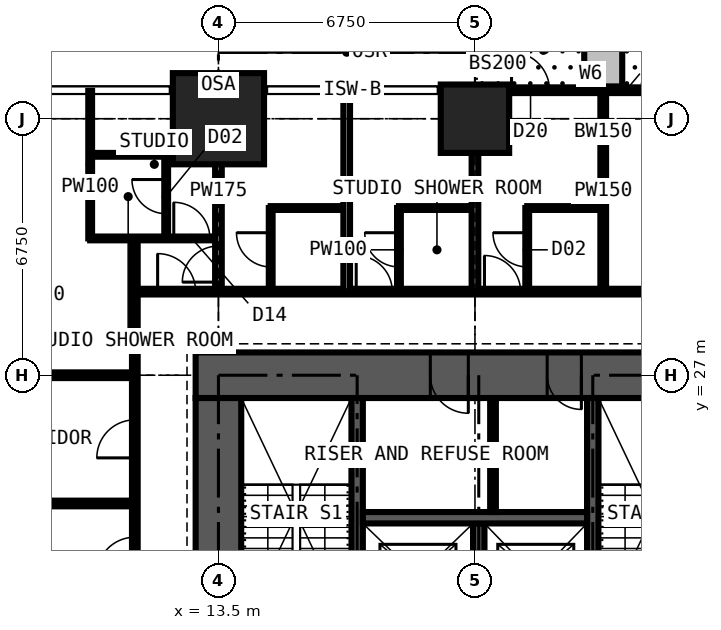
"""IFC4 building model, lengths in metres.
Left out: names, types, materials, properties, quantities, classifications, styles, units other than length and angle.
Written with IfcOpenShell. Run it as: python <this file> out.ifc"""

import sys

from ifc_helpers import new_model, si_unit, direction, frame, frame_2d, origin, origin_2d, place, context, subcontext, project, spatial, rectangle, extrude, element, fill, save


model = new_model("IFC4")
c1 = context("Model", 3, precision=1e-05, world=origin(), true_north=direction((0.0, 1.0)))
c2 = subcontext(c1, "Body", "Model", "MODEL_VIEW")
j1 = project(units=[si_unit("LENGTHUNIT", "METRE"), si_unit("PLANEANGLEUNIT", "RADIAN")], contexts=[c1])
p1 = place(None, origin())
s1 = spatial("IfcSite", under=j1, at=p1, CompositionType="ELEMENT")
p2 = place(p1, origin())
s2 = spatial("IfcBuilding", under=s1, at=p2, CompositionType="ELEMENT")
p3 = place(p2, frame((0.0, 0.0, 83.7)))
s3 = spatial("IfcBuildingStorey", under=s2, at=p3, CompositionType="ELEMENT", Elevation=83.7)
p4 = place(p3, frame((13.5, 33.75, 0.0), z_axis=(0.0, 0.0, 1.0), x_axis=(1.0, 0.0, 0.0)))
e1 = element("IfcColumn", 1, at=p4, inside=s3, PredefinedType="COLUMN", context=c2, shape_type="SweptSolid", body=[
    extrude(rectangle(XDim=2.4, YDim=2.4, at=origin_2d()), origin(), (0.0, 0.0, 1.0), 3.6),
])
p5 = place(p3, frame((20.25, 33.75, 0.0), z_axis=(0.0, 0.0, 1.0), x_axis=(1.0, 0.0, 0.0)))
e2 = element("IfcColumn", 2, at=p5, inside=s3, PredefinedType="COLUMN", context=c2, shape_type="SweptSolid", body=[
    extrude(rectangle(XDim=1.8, YDim=1.8, at=origin_2d()), origin(), (0.0, 0.0, 1.0), 3.6),
])
p6 = place(p3, frame((27.6, 27.0, 0.0), z_axis=(0.0, 0.0, 1.0), x_axis=(-1.0, 0.0, 0.0)))
e3 = element("IfcWall", 3, at=p6, inside=s3, PredefinedType="SHEAR", context=c2, shape_type="SweptSolid", body=[
    extrude(rectangle(XDim=14.7, YDim=1.2, at=frame_2d((7.35, 0.0))), origin(), (0.0, 0.0, 1.0), 3.6),
])
p7 = place(p6, frame((4.55, 0.0, 0.0)))
e4 = element("IfcOpeningElement", 4, at=p7, cuts=e3, PredefinedType="OPENING", context=c2, shape_type="SweptSolid", body=[
    extrude(rectangle(XDim=0.9, YDim=2.2, at=frame_2d((0.45, 1.1))), frame((0.0, 0.61, 0.0), z_axis=(0.0, -1.0, 0.0), x_axis=(1.0, 0.0, 0.0)), (0.0, 0.0, 1.0), 1.22),
])
p8 = place(p6, frame((7.525, 0.0, 0.0)))
e5 = element("IfcOpeningElement", 5, at=p8, cuts=e3, PredefinedType="OPENING", context=c2, shape_type="SweptSolid", body=[
    extrude(rectangle(XDim=1.0, YDim=2.2, at=frame_2d((0.5, 1.1))), frame((0.0, 0.61, 0.0), z_axis=(0.0, -1.0, 0.0), x_axis=(1.0, 0.0, 0.0)), (0.0, 0.0, 1.0), 1.22),
])
p9 = place(p3, frame((13.5, 26.4, 0.0), z_axis=(0.0, 0.0, 1.0), x_axis=(0.0, -1.0, 0.0)))
e6 = element("IfcWall", 6, at=p9, inside=s3, PredefinedType="SHEAR", context=c2, shape_type="SweptSolid", body=[
    extrude(rectangle(XDim=12.3, YDim=1.2, at=frame_2d((6.15, 0.0))), origin(), (0.0, 0.0, 1.0), 3.6),
])
p10 = place(p9, frame((7.45, 0.0, 0.0)))
e7 = element("IfcOpeningElement", 7, at=p10, cuts=e6, PredefinedType="OPENING", context=c2, shape_type="SweptSolid", body=[
    extrude(rectangle(XDim=1.2, YDim=2.2, at=frame_2d((0.6, 1.1))), frame((0.0, 0.61, 0.0), z_axis=(0.0, -1.0, 0.0), x_axis=(1.0, 0.0, 0.0)), (0.0, 0.0, 1.0), 1.22),
])
p11 = place(p3, frame((20.25, 34.5, 0.0), z_axis=(0.0, 0.0, 1.0), x_axis=(1.0, 0.0, 0.0)))
e8 = element("IfcWall", 8, at=p11, inside=s3, PredefinedType="SOLIDWALL", context=c2, shape_type="SweptSolid", body=[
    extrude(rectangle(XDim=6.75, YDim=0.15, at=frame_2d((3.375, 0.0))), origin(), (0.0, 0.0, 1.0), 3.375),
])
p12 = place(p11, frame((0.962, 0.0, 0.0)))
e9 = element("IfcOpeningElement", 9, at=p12, cuts=e8, PredefinedType="OPENING", context=c2, shape_type="SweptSolid", body=[
    extrude(rectangle(XDim=1.0, YDim=2.2, at=frame_2d((0.5, 1.1))), frame((0.0, 0.085, 0.0), z_axis=(0.0, -1.0, 0.0), x_axis=(1.0, 0.0, 0.0)), (0.0, 0.0, 1.0), 0.17),
])
p13 = place(p11, frame((2.025, 0.0, 0.9)))
e10 = element("IfcOpeningElement", 10, at=p13, cuts=e8, PredefinedType="OPENING", context=c2, shape_type="SweptSolid", body=[
    extrude(rectangle(XDim=1.2, YDim=1.8, at=frame_2d((0.6, 0.9))), frame((0.0, 0.085, 0.0), z_axis=(0.0, -1.0, 0.0), x_axis=(1.0, 0.0, 0.0)), (0.0, 0.0, 1.0), 0.17),
])
p14 = place(p11, frame((4.488, 0.0, 0.0)))
e11 = element("IfcOpeningElement", 11, at=p14, cuts=e8, PredefinedType="OPENING", context=c2, shape_type="SweptSolid", body=[
    extrude(rectangle(XDim=1.0, YDim=2.2, at=frame_2d((0.5, 1.1))), frame((0.0, 0.085, 0.0), z_axis=(0.0, -1.0, 0.0), x_axis=(1.0, 0.0, 0.0)), (0.0, 0.0, 1.0), 0.17),
])
p15 = place(p11, frame((3.525, 0.0, 0.9)))
e12 = element("IfcOpeningElement", 12, at=p15, cuts=e8, PredefinedType="OPENING", context=c2, shape_type="SweptSolid", body=[
    extrude(rectangle(XDim=0.9, YDim=1.8, at=frame_2d((0.45, 0.9))), frame((0.0, 0.085, 0.0), z_axis=(0.0, -1.0, 0.0), x_axis=(1.0, 0.0, 0.0)), (0.0, 0.0, 1.0), 0.17),
])
p16 = place(p3, frame((23.625, 34.6, 0.0), z_axis=(0.0, 0.0, 1.0), x_axis=(0.0, 1.0, 0.0)))
e13 = element("IfcWall", 13, at=p16, inside=s3, PredefinedType="USERDEFINED", context=c2, shape_type="SweptSolid", body=[
    extrude(rectangle(XDim=2.2, YDim=1.0, at=frame_2d((1.1, 0.0))), origin(), (0.0, 0.0, 1.0), 0.9),
])
for number, where, z_axis, x_axis in (
    (14, (17.15, 20.3, 0.0), (0.0, 0.0, 1.0), (0.0, 1.0, 0.0)),
    (15, (23.35, 20.3, 0.0), (0.0, 0.0, 1.0), (0.0, 1.0, 0.0)),
):
    element("IfcWall", number, at=place(p3, frame(where, z_axis=z_axis, x_axis=x_axis)), inside=s3, PredefinedType="SHEAR", context=c2, shape_type="SweptSolid", body=[
        extrude(rectangle(XDim=6.1, YDim=0.3, at=frame_2d((3.05, 0.0))), origin(), (0.0, 0.0, 1.0), 3.6),
    ])
p17 = place(p3, frame((20.35, 20.3, 0.0), z_axis=(0.0, 0.0, 1.0), x_axis=(0.0, 1.0, 0.0)))
e16 = element("IfcWall", 16, at=p17, inside=s3, PredefinedType="SHEAR", context=c2, shape_type="SweptSolid", body=[
    extrude(rectangle(XDim=2.8, YDim=0.3, at=frame_2d((1.4, 0.0))), origin(), (0.0, 0.0, 1.0), 3.6),
])
p18 = place(p3, frame((17.3, 23.25, 0.0), z_axis=(0.0, 0.0, 1.0), x_axis=(1.0, 0.0, 0.0)))
e17 = element("IfcWall", 17, at=p18, inside=s3, PredefinedType="SHEAR", context=c2, shape_type="SweptSolid", body=[
    extrude(rectangle(XDim=5.9, YDim=0.3, at=frame_2d((2.95, 0.0))), origin(), (0.0, 0.0, 1.0), 3.6),
])
p19 = place(p3, frame((20.725, 23.4, 0.0), z_axis=(0.0, 0.0, 1.0), x_axis=(0.0, 1.0, 0.0)))
e18 = element("IfcWall", 18, at=p19, inside=s3, PredefinedType="PARTITIONING", context=c2, shape_type="SweptSolid", body=[
    extrude(rectangle(XDim=3.0, YDim=0.15, at=frame_2d((1.5, 0.0))), origin(), (0.0, 0.0, 1.0), 3.375),
])
p20 = place(p3, frame((-0.734, 23.625, 0.0), z_axis=(0.0, 0.0, 1.0), x_axis=(1.0, 0.0, 0.0)))
e19 = element("IfcWall", 19, at=p20, inside=s3, PredefinedType="PARTITIONING", context=c2, shape_type="SweptSolid", body=[
    extrude(rectangle(XDim=12.034, YDim=0.15, at=frame_2d((6.017, 0.0))), origin(), (0.0, 0.0, 1.0), 3.375),
])
p21 = place(p3, frame((-0.734, 27.0, 0.0), z_axis=(0.0, 0.0, 1.0), x_axis=(1.0, 0.0, 0.0)))
e20 = element("IfcWall", 20, at=p21, inside=s3, PredefinedType="PARTITIONING", context=c2, shape_type="SweptSolid", body=[
    extrude(rectangle(XDim=12.034, YDim=0.15, at=frame_2d((6.017, 0.0))), origin(), (0.0, 0.0, 1.0), 2.806),
])
p22 = place(p21, frame((8.534, 0.0, 0.0)))
e21 = element("IfcOpeningElement", 21, at=p22, cuts=e20, PredefinedType="OPENING", context=c2, shape_type="SweptSolid", body=[
    extrude(rectangle(XDim=1.0, YDim=2.2, at=frame_2d((0.5, 1.1))), frame((0.0, 0.085, 0.0), z_axis=(0.0, -1.0, 0.0), x_axis=(1.0, 0.0, 0.0)), (0.0, 0.0, 1.0), 0.17),
])
p23 = place(p3, frame((10.125, 30.6, 0.0), z_axis=(0.0, 0.0, 1.0), x_axis=(0.0, 1.0, 0.0)))
e22 = element("IfcWall", 22, at=p23, inside=s3, PredefinedType="PARTITIONING", context=c2, shape_type="SweptSolid", body=[
    extrude(rectangle(XDim=3.884, YDim=0.1, at=frame_2d((1.942, 0.0))), origin(), (0.0, 0.0, 1.0), 3.375),
])
p24 = place(p3, frame((10.125, 30.6, 0.0), z_axis=(0.0, 0.0, 1.0), x_axis=(1.0, 0.0, 0.0)))
e23 = element("IfcWall", 23, at=p24, inside=s3, PredefinedType="PARTITIONING", context=c2, shape_type="SweptSolid", body=[
    extrude(rectangle(XDim=3.375, YDim=0.1, at=frame_2d((1.688, 0.0))), origin(), (0.0, 0.0, 1.0), 3.375),
])
p25 = place(p24, frame((2.2, 0.0, 0.0)))
e24 = element("IfcOpeningElement", 24, at=p25, cuts=e23, PredefinedType="OPENING", context=c2, shape_type="SweptSolid", body=[
    extrude(rectangle(XDim=0.95, YDim=2.2, at=frame_2d((0.475, 1.1))), frame((0.0, 0.06, 0.0), z_axis=(0.0, -1.0, 0.0), x_axis=(1.0, 0.0, 0.0)), (0.0, 0.0, 1.0), 0.12),
])
p26 = place(p3, frame((10.125, 32.8, 0.0), z_axis=(0.0, 0.0, 1.0), x_axis=(1.0, 0.0, 0.0)))
e25 = element("IfcWall", 25, at=p26, inside=s3, PredefinedType="PARTITIONING", context=c2, shape_type="SweptSolid", body=[
    extrude(rectangle(XDim=2.0, YDim=0.1, at=frame_2d((1.0, 0.0))), origin(), (0.0, 0.0, 1.0), 3.375),
])
p27 = place(p3, frame((11.3, 11.3, 0.0), z_axis=(0.0, 0.0, 1.0), x_axis=(0.0, 1.0, 0.0)))
e26 = element("IfcWall", 26, at=p27, inside=s3, PredefinedType="PARTITIONING", context=c2, shape_type="SweptSolid", body=[
    extrude(rectangle(XDim=19.3, YDim=0.15, at=frame_2d((9.65, 0.0))), origin(), (0.0, 0.0, 1.0), 3.375),
])
p28 = place(p27, frame((13.525, 0.0, 0.0)))
e27 = element("IfcOpeningElement", 27, at=p28, cuts=e26, PredefinedType="OPENING", context=c2, shape_type="SweptSolid", body=[
    extrude(rectangle(XDim=1.0, YDim=2.2, at=frame_2d((0.5, 1.1))), frame((0.0, 0.085, 0.0), z_axis=(0.0, -1.0, 0.0), x_axis=(1.0, 0.0, 0.0)), (0.0, 0.0, 1.0), 0.17),
])
p29 = place(p27, frame((10.438, 0.0, 0.0)))
e28 = element("IfcOpeningElement", 28, at=p29, cuts=e26, PredefinedType="OPENING", context=c2, shape_type="SweptSolid", body=[
    extrude(rectangle(XDim=1.0, YDim=2.2, at=frame_2d((0.5, 1.1))), frame((0.0, 0.085, 0.0), z_axis=(0.0, -1.0, 0.0), x_axis=(1.0, 0.0, 0.0)), (0.0, 0.0, 1.0), 0.17),
])
p30 = place(p3, frame((11.3, 29.2, 0.0), z_axis=(0.0, 0.0, 1.0), x_axis=(1.0, 0.0, 0.0)))
e29 = element("IfcWall", 29, at=p30, inside=s3, PredefinedType="PARTITIONING", context=c2, shape_type="SweptSolid", body=[
    extrude(rectangle(XDim=19.075, YDim=0.15, at=frame_2d((9.538, 0.0))), origin(), (0.0, 0.0, 1.0), 3.375),
])
p31 = place(p30, frame((5.825, 0.0, 0.0)))
e30 = element("IfcOpeningElement", 30, at=p31, cuts=e29, PredefinedType="OPENING", context=c2, shape_type="SweptSolid", body=[
    extrude(rectangle(XDim=0.95, YDim=2.2, at=frame_2d((0.475, 1.1))), frame((0.0, 0.085, 0.0), z_axis=(0.0, -1.0, 0.0), x_axis=(1.0, 0.0, 0.0)), (0.0, 0.0, 1.0), 0.17),
])
p32 = place(p30, frame((9.2, 0.0, 0.0)))
e31 = element("IfcOpeningElement", 31, at=p32, cuts=e29, PredefinedType="OPENING", context=c2, shape_type="SweptSolid", body=[
    extrude(rectangle(XDim=0.95, YDim=2.2, at=frame_2d((0.475, 1.1))), frame((0.0, 0.085, 0.0), z_axis=(0.0, -1.0, 0.0), x_axis=(1.0, 0.0, 0.0)), (0.0, 0.0, 1.0), 0.17),
])
p33 = place(p30, frame((0.6, 0.0, 0.0)))
e32 = element("IfcOpeningElement", 32, at=p33, cuts=e29, PredefinedType="OPENING", context=c2, shape_type="SweptSolid", body=[
    extrude(rectangle(XDim=1.0, YDim=2.2, at=frame_2d((0.5, 1.1))), frame((0.0, 0.085, 0.0), z_axis=(0.0, -1.0, 0.0), x_axis=(1.0, 0.0, 0.0)), (0.0, 0.0, 1.0), 0.17),
])
p34 = place(p3, frame((12.125, 30.6, 0.0), z_axis=(0.0, 0.0, 1.0), x_axis=(0.0, 1.0, 0.0)))
e33 = element("IfcWall", 33, at=p34, inside=s3, PredefinedType="PARTITIONING", context=c2, shape_type="SweptSolid", body=[
    extrude(rectangle(XDim=2.2, YDim=0.1, at=frame_2d((1.1, 0.0))), origin(), (0.0, 0.0, 1.0), 3.375),
])
p35 = place(p34, frame((0.65, 0.0, 0.0)))
e34 = element("IfcOpeningElement", 34, at=p35, cuts=e33, PredefinedType="OPENING", context=c2, shape_type="SweptSolid", body=[
    extrude(rectangle(XDim=0.9, YDim=2.2, at=frame_2d((0.45, 1.1))), frame((0.0, 0.06, 0.0), z_axis=(0.0, -1.0, 0.0), x_axis=(1.0, 0.0, 0.0)), (0.0, 0.0, 1.0), 0.12),
])
p36 = place(p3, frame((13.5, 29.2, 0.0), z_axis=(0.0, 0.0, 1.0), x_axis=(0.0, 1.0, 0.0)))
e35 = element("IfcWall", 35, at=p36, inside=s3, PredefinedType="PARTITIONING", context=c2, shape_type="SweptSolid", body=[
    extrude(rectangle(XDim=5.284, YDim=0.175, at=frame_2d((2.642, 0.0))), origin(), (0.0, 0.0, 1.0), 2.61),
])
p37 = place(p36, frame((0.25, 0.0, 0.0)))
e36 = element("IfcOpeningElement", 36, at=p37, cuts=e35, PredefinedType="OPENING", context=c2, shape_type="SweptSolid", body=[
    extrude(rectangle(XDim=0.95, YDim=2.2, at=frame_2d((0.475, 1.1))), frame((0.0, 0.097, 0.0), z_axis=(0.0, -1.0, 0.0), x_axis=(1.0, 0.0, 0.0)), (0.0, 0.0, 1.0), 0.195),
])
p38 = place(p3, frame((14.875, 29.2, 0.0), z_axis=(0.0, 0.0, 1.0), x_axis=(0.0, 1.0, 0.0)))
e37 = element("IfcWall", 37, at=p38, inside=s3, PredefinedType="PARTITIONING", context=c2, shape_type="SweptSolid", body=[
    extrude(rectangle(XDim=2.2, YDim=0.1, at=frame_2d((1.1, 0.0))), origin(), (0.0, 0.0, 1.0), 3.375),
])
p39 = place(p38, frame((0.65, 0.0, 0.0)))
e38 = element("IfcOpeningElement", 38, at=p39, cuts=e37, PredefinedType="OPENING", context=c2, shape_type="SweptSolid", body=[
    extrude(rectangle(XDim=0.9, YDim=2.2, at=frame_2d((0.45, 1.1))), frame((0.0, 0.06, 0.0), z_axis=(0.0, -1.0, 0.0), x_axis=(1.0, 0.0, 0.0)), (0.0, 0.0, 1.0), 0.12),
])
p40 = place(p3, frame((14.875, 31.4, 0.0), z_axis=(0.0, 0.0, 1.0), x_axis=(1.0, 0.0, 0.0)))
e39 = element("IfcWall", 39, at=p40, inside=s3, PredefinedType="PARTITIONING", context=c2, shape_type="SweptSolid", body=[
    extrude(rectangle(XDim=2.0, YDim=0.1, at=frame_2d((1.0, 0.0))), origin(), (0.0, 0.0, 1.0), 3.375),
])
p41 = place(p3, frame((16.875, 29.2, 0.0), z_axis=(0.0, 0.0, 1.0), x_axis=(0.0, 1.0, 0.0)))
e40 = element("IfcWall", 40, at=p41, inside=s3, PredefinedType="PARTITIONING", context=c2, shape_type="SweptSolid", body=[
    extrude(rectangle(XDim=5.284, YDim=0.175, at=frame_2d((2.642, 0.0))), origin(), (0.0, 0.0, 1.0), 3.375),
])
p42 = place(p3, frame((18.25, 29.2, 0.0), z_axis=(0.0, 0.0, 1.0), x_axis=(0.0, 1.0, 0.0)))
e41 = element("IfcWall", 41, at=p42, inside=s3, PredefinedType="PARTITIONING", context=c2, shape_type="SweptSolid", body=[
    extrude(rectangle(XDim=2.2, YDim=0.1, at=frame_2d((1.1, 0.0))), origin(), (0.0, 0.0, 1.0), 3.375),
])
p43 = place(p42, frame((0.65, 0.0, 0.0)))
e42 = element("IfcOpeningElement", 42, at=p43, cuts=e41, PredefinedType="OPENING", context=c2, shape_type="SweptSolid", body=[
    extrude(rectangle(XDim=0.9, YDim=2.2, at=frame_2d((0.45, 1.1))), frame((0.0, 0.06, 0.0), z_axis=(0.0, -1.0, 0.0), x_axis=(1.0, 0.0, 0.0)), (0.0, 0.0, 1.0), 0.12),
])
p44 = place(p3, frame((18.25, 31.4, 0.0), z_axis=(0.0, 0.0, 1.0), x_axis=(1.0, 0.0, 0.0)))
e43 = element("IfcWall", 43, at=p44, inside=s3, PredefinedType="PARTITIONING", context=c2, shape_type="SweptSolid", body=[
    extrude(rectangle(XDim=2.0, YDim=0.1, at=frame_2d((1.0, 0.0))), origin(), (0.0, 0.0, 1.0), 3.375),
])
p45 = place(p3, frame((20.25, 29.2, 0.0), z_axis=(0.0, 0.0, 1.0), x_axis=(0.0, 1.0, 0.0)))
e44 = element("IfcWall", 44, at=p45, inside=s3, PredefinedType="PARTITIONING", context=c2, shape_type="SweptSolid", body=[
    extrude(rectangle(XDim=5.284, YDim=0.175, at=frame_2d((2.642, 0.0))), origin(), (0.0, 0.0, 1.0), 2.61),
])
p46 = place(p3, frame((21.625, 29.2, 0.0), z_axis=(0.0, 0.0, 1.0), x_axis=(0.0, 1.0, 0.0)))
e45 = element("IfcWall", 45, at=p46, inside=s3, PredefinedType="PARTITIONING", context=c2, shape_type="SweptSolid", body=[
    extrude(rectangle(XDim=2.2, YDim=0.1, at=frame_2d((1.1, 0.0))), origin(), (0.0, 0.0, 1.0), 3.375),
])
p47 = place(p46, frame((0.65, 0.0, 0.0)))
e46 = element("IfcOpeningElement", 46, at=p47, cuts=e45, PredefinedType="OPENING", context=c2, shape_type="SweptSolid", body=[
    extrude(rectangle(XDim=0.9, YDim=2.2, at=frame_2d((0.45, 1.1))), frame((0.0, 0.06, 0.0), z_axis=(0.0, -1.0, 0.0), x_axis=(1.0, 0.0, 0.0)), (0.0, 0.0, 1.0), 0.12),
])
p48 = place(p3, frame((21.625, 31.4, 0.0), z_axis=(0.0, 0.0, 1.0), x_axis=(1.0, 0.0, 0.0)))
e47 = element("IfcWall", 47, at=p48, inside=s3, PredefinedType="PARTITIONING", context=c2, shape_type="SweptSolid", body=[
    extrude(rectangle(XDim=2.0, YDim=0.1, at=frame_2d((1.0, 0.0))), origin(), (0.0, 0.0, 1.0), 3.375),
])
p49 = place(p3, frame((23.625, 29.2, 0.0), z_axis=(0.0, 0.0, 1.0), x_axis=(0.0, 1.0, 0.0)))
e48 = element("IfcWall", 48, at=p49, inside=s3, PredefinedType="PARTITIONING", context=c2, shape_type="SweptSolid", body=[
    extrude(rectangle(XDim=5.284, YDim=0.15, at=frame_2d((2.642, 0.0))), origin(), (0.0, 0.0, 1.0), 3.375),
])
p50 = place(p12, origin())
e49 = element("IfcDoor", 49, at=p50, inside=s3, OperationType="SINGLE_SWING_LEFT", PredefinedType="DOOR", context=c2, shape_type="SweptSolid", body=[
    extrude(rectangle(XDim=1.0, YDim=2.2, at=frame_2d((0.5, 1.1))), frame((0.0, 0.025, 0.0), z_axis=(0.0, -1.0, 0.0), x_axis=(1.0, 0.0, 0.0)), (0.0, 0.0, 1.0), 0.05),
])
fill(e9, e49)
p51 = place(p13, origin())
e50 = element("IfcWindow", 50, at=p51, inside=s3, PartitioningType="SINGLE_PANEL", PredefinedType="WINDOW", context=c2, shape_type="SweptSolid", body=[
    extrude(rectangle(XDim=1.2, YDim=1.8, at=frame_2d((0.6, 0.9))), frame((0.0, 0.03, 0.0), z_axis=(0.0, -1.0, 0.0), x_axis=(1.0, 0.0, 0.0)), (0.0, 0.0, 1.0), 0.06),
])
fill(e10, e50)
p52 = place(p15, origin())
e51 = element("IfcWindow", 51, at=p52, inside=s3, PartitioningType="SINGLE_PANEL", PredefinedType="WINDOW", context=c2, shape_type="SweptSolid", body=[
    extrude(rectangle(XDim=0.9, YDim=1.8, at=frame_2d((0.45, 0.9))), frame((0.0, 0.03, 0.0), z_axis=(0.0, -1.0, 0.0), x_axis=(1.0, 0.0, 0.0)), (0.0, 0.0, 1.0), 0.06),
])
fill(e12, e51)
p53 = place(p7, origin())
e52 = element("IfcDoor", 52, at=p53, inside=s3, OperationType="SINGLE_SWING_LEFT", PredefinedType="DOOR", context=c2, shape_type="SweptSolid", body=[
    extrude(rectangle(XDim=0.9, YDim=2.2, at=frame_2d((0.45, 1.1))), frame((0.0, 0.4, 0.0), z_axis=(0.0, -1.0, 0.0), x_axis=(1.0, 0.0, 0.0)), (0.0, 0.0, 1.0), 0.8),
])
fill(e4, e52)
p54 = place(p8, origin())
e53 = element("IfcDoor", 53, at=p54, inside=s3, OperationType="SINGLE_SWING_LEFT", PredefinedType="DOOR", context=c2, shape_type="SweptSolid", body=[
    extrude(rectangle(XDim=1.0, YDim=2.2, at=frame_2d((0.5, 1.1))), frame((0.0, 0.025, 0.0), z_axis=(0.0, -1.0, 0.0), x_axis=(1.0, 0.0, 0.0)), (0.0, 0.0, 1.0), 0.05),
])
fill(e5, e53)
p55 = place(p25, origin())
e54 = element("IfcDoor", 54, at=p55, inside=s3, OperationType="SINGLE_SWING_LEFT", PredefinedType="DOOR", context=c2, shape_type="SweptSolid", body=[
    extrude(rectangle(XDim=0.95, YDim=2.2, at=frame_2d((0.475, 1.1))), frame((0.0, 0.025, 0.0), z_axis=(0.0, -1.0, 0.0), x_axis=(1.0, 0.0, 0.0)), (0.0, 0.0, 1.0), 0.05),
])
fill(e24, e54)
p56 = place(p35, origin())
e55 = element("IfcDoor", 55, at=p56, inside=s3, OperationType="SINGLE_SWING_RIGHT", PredefinedType="DOOR", context=c2, shape_type="SweptSolid", body=[
    extrude(rectangle(XDim=0.9, YDim=2.2, at=frame_2d((0.45, 1.1))), frame((0.0, 0.025, 0.0), z_axis=(0.0, -1.0, 0.0), x_axis=(1.0, 0.0, 0.0)), (0.0, 0.0, 1.0), 0.05),
])
fill(e34, e55)
p57 = place(p37, origin())
e56 = element("IfcDoor", 56, at=p57, inside=s3, OperationType="SINGLE_SWING_LEFT", PredefinedType="DOOR", context=c2, shape_type="SweptSolid", body=[
    extrude(rectangle(XDim=0.95, YDim=2.2, at=frame_2d((0.475, 1.1))), frame((0.0, 0.025, 0.0), z_axis=(0.0, -1.0, 0.0), x_axis=(1.0, 0.0, 0.0)), (0.0, 0.0, 1.0), 0.05),
])
fill(e36, e56)
p58 = place(p39, origin())
e57 = element("IfcDoor", 57, at=p58, inside=s3, OperationType="SINGLE_SWING_RIGHT", PredefinedType="DOOR", context=c2, shape_type="SweptSolid", body=[
    extrude(rectangle(XDim=0.9, YDim=2.2, at=frame_2d((0.45, 1.1))), frame((0.0, 0.025, 0.0), z_axis=(0.0, -1.0, 0.0), x_axis=(1.0, 0.0, 0.0)), (0.0, 0.0, 1.0), 0.05),
])
fill(e38, e57)
p59 = place(p31, origin())
e58 = element("IfcDoor", 58, at=p59, inside=s3, OperationType="SINGLE_SWING_LEFT", PredefinedType="DOOR", context=c2, shape_type="SweptSolid", body=[
    extrude(rectangle(XDim=0.95, YDim=2.2, at=frame_2d((0.475, 1.1))), frame((0.0, 0.025, 0.0), z_axis=(0.0, -1.0, 0.0), x_axis=(1.0, 0.0, 0.0)), (0.0, 0.0, 1.0), 0.05),
])
fill(e30, e58)
p60 = place(p43, origin())
e59 = element("IfcDoor", 59, at=p60, inside=s3, OperationType="SINGLE_SWING_RIGHT", PredefinedType="DOOR", context=c2, shape_type="SweptSolid", body=[
    extrude(rectangle(XDim=0.9, YDim=2.2, at=frame_2d((0.45, 1.1))), frame((0.0, 0.025, 0.0), z_axis=(0.0, -1.0, 0.0), x_axis=(1.0, 0.0, 0.0)), (0.0, 0.0, 1.0), 0.05),
])
fill(e42, e59)
p61 = place(p32, origin())
e60 = element("IfcDoor", 60, at=p61, inside=s3, OperationType="SINGLE_SWING_LEFT", PredefinedType="DOOR", context=c2, shape_type="SweptSolid", body=[
    extrude(rectangle(XDim=0.95, YDim=2.2, at=frame_2d((0.475, 1.1))), frame((0.0, 0.025, 0.0), z_axis=(0.0, -1.0, 0.0), x_axis=(1.0, 0.0, 0.0)), (0.0, 0.0, 1.0), 0.05),
])
fill(e31, e60)
p62 = place(p47, origin())
e61 = element("IfcDoor", 61, at=p62, inside=s3, OperationType="SINGLE_SWING_RIGHT", PredefinedType="DOOR", context=c2, shape_type="SweptSolid", body=[
    extrude(rectangle(XDim=0.9, YDim=2.2, at=frame_2d((0.45, 1.1))), frame((0.0, 0.025, 0.0), z_axis=(0.0, -1.0, 0.0), x_axis=(1.0, 0.0, 0.0)), (0.0, 0.0, 1.0), 0.05),
])
fill(e46, e61)
p63 = place(p33, origin())
e62 = element("IfcDoor", 62, at=p63, inside=s3, OperationType="SINGLE_SWING_LEFT", PredefinedType="DOOR", context=c2, shape_type="SweptSolid", body=[
    extrude(rectangle(XDim=1.0, YDim=2.2, at=frame_2d((0.5, 1.1))), frame((0.0, 0.025, 0.0), z_axis=(0.0, -1.0, 0.0), x_axis=(1.0, 0.0, 0.0)), (0.0, 0.0, 1.0), 0.05),
])
fill(e32, e62)
p64 = place(p28, origin())
e63 = element("IfcDoor", 63, at=p64, inside=s3, OperationType="SINGLE_SWING_LEFT", PredefinedType="DOOR", context=c2, shape_type="SweptSolid", body=[
    extrude(rectangle(XDim=1.0, YDim=2.2, at=frame_2d((0.5, 1.1))), frame((0.0, 0.025, 0.0), z_axis=(0.0, -1.0, 0.0), x_axis=(1.0, 0.0, 0.0)), (0.0, 0.0, 1.0), 0.05),
])
fill(e27, e63)
p65 = place(p29, origin())
e64 = element("IfcDoor", 64, at=p65, inside=s3, OperationType="SINGLE_SWING_LEFT", PredefinedType="DOOR", context=c2, shape_type="SweptSolid", body=[
    extrude(rectangle(XDim=1.0, YDim=2.2, at=frame_2d((0.5, 1.1))), frame((0.0, 0.025, 0.0), z_axis=(0.0, -1.0, 0.0), x_axis=(1.0, 0.0, 0.0)), (0.0, 0.0, 1.0), 0.05),
])
fill(e28, e64)
save(model, sys.argv[1])
